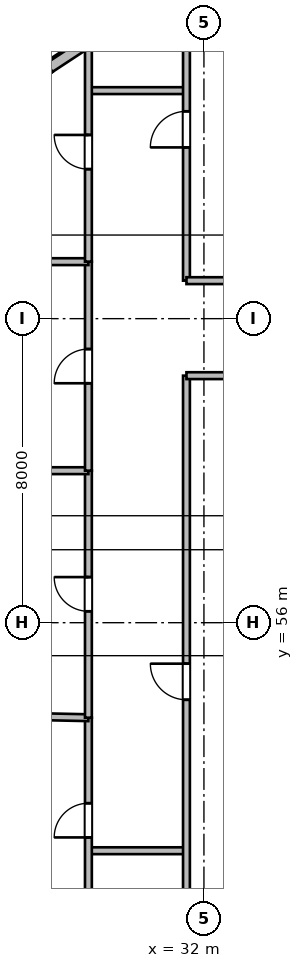
"""IFC4 building model, lengths in metres.
Left out: names, types, materials, properties, quantities, classifications, styles, units other than length and angle.
Written with IfcOpenShell. Run it as: python <this file> out.ifc"""

import sys

from ifc_helpers import new_model, si_unit, direction, frame, frame_2d, origin, place, context, subcontext, project, spatial, rectangle, extrude, source, transform, mapped, element, fill, save


model = new_model("IFC4")
c1 = context("Model", 3, precision=1e-05, world=origin(), true_north=direction((0.0, 1.0)))
c2 = subcontext(c1, "Body", "Model", "MODEL_VIEW")
j1 = project(units=[si_unit("LENGTHUNIT", "METRE"), si_unit("PLANEANGLEUNIT", "RADIAN")], contexts=[c1])
p1 = place(None, origin())
s1 = spatial("IfcSite", under=j1, at=p1, CompositionType="ELEMENT")
p2 = place(p1, origin())
s2 = spatial("IfcBuilding", under=s1, at=p2, CompositionType="ELEMENT")
p3 = place(p2, frame((0.0, 0.0, 170.1)))
s3 = spatial("IfcBuildingStorey", under=s2, at=p3, CompositionType="ELEMENT", Elevation=170.1)
m1 = source(origin(), c2, "Body", "SweptSolid", [
    extrude(rectangle(XDim=2.812, YDim=0.28, at=frame_2d((1.406, 0.0))), origin(), (0.0, 0.0, 1.0), 3.65),
])
p4 = place(p3, frame((33.945, 48.973, 0.0), z_axis=(0.0, 0.0, 1.0), x_axis=(-0.694583668785, -0.719411931411, 0.0)))
e1 = element("IfcWall", 1, at=p4, inside=s3, PredefinedType="SOLIDWALL", context=c2, shape_type="MappedRepresentation", body=[
    mapped(m1, transform((0.0, 0.0, 0.0), scale=1.0)),
])
m2 = source(origin(), c2, "Body", "SweptSolid", [
    extrude(rectangle(XDim=4.634, YDim=0.28, at=frame_2d((2.317, 0.0))), origin(), (0.0, 0.0, 1.0), 3.65),
])
p5 = place(p3, frame((24.381, 67.642, 0.0), z_axis=(0.0, 0.0, 1.0), x_axis=(0.767910229096, 0.640557475993, 0.0)))
e2 = element("IfcWall", 2, at=p5, inside=s3, PredefinedType="SOLIDWALL", context=c2, shape_type="MappedRepresentation", body=[
    mapped(m2, transform((0.0, 0.0, 0.0), scale=1.0)),
])
m3 = source(origin(), c2, "Body", "SweptSolid", [
    extrude(rectangle(XDim=4.501, YDim=0.28, at=frame_2d((2.25, 0.0))), origin(), (0.0, 0.0, 1.0), 3.65),
])
p6 = place(p3, frame((27.939, 70.61, 0.0), z_axis=(0.0, 0.0, 1.0), x_axis=(0.835984920737, 0.548752414391, 0.0)))
e3 = element("IfcWall", 3, at=p6, inside=s3, PredefinedType="SOLIDWALL", context=c2, shape_type="MappedRepresentation", body=[
    mapped(m3, transform((0.0, 0.0, 0.0), scale=1.0)),
])
m4 = source(origin(), c2, "Body", "SweptSolid", [
    extrude(rectangle(XDim=2.5, YDim=0.18, at=frame_2d((1.25, 0.0))), origin(), (0.0, 0.0, 1.0), 3.65),
])
p7 = place(p3, frame((29.0, 50.0, 0.0), z_axis=(0.0, 0.0, 1.0), x_axis=(1.0, 0.0, 0.0)))
e4 = element("IfcWall", 4, at=p7, inside=s3, PredefinedType="PLUMBINGWALL", context=c2, shape_type="MappedRepresentation", body=[
    mapped(m4, transform((0.0, 0.0, 0.0), scale=1.0)),
])
m5 = source(origin(), c2, "Body", "SweptSolid", [
    extrude(rectangle(XDim=2.5, YDim=0.18, at=frame_2d((1.25, 0.0))), origin(), (0.0, 0.0, 1.0), 3.022),
])
p8 = place(p3, frame((29.0, 70.0, 0.0), z_axis=(0.0, 0.0, 1.0), x_axis=(1.0, 0.0, 0.0)))
e5 = element("IfcWall", 5, at=p8, inside=s3, PredefinedType="PLUMBINGWALL", context=c2, shape_type="MappedRepresentation", body=[
    mapped(m5, transform((0.0, 0.0, 0.0), scale=1.0)),
])
m6 = source(origin(), c2, "Body", "SweptSolid", [
    extrude(rectangle(XDim=10.735, YDim=0.18, at=frame_2d((5.368, 0.0))), origin(), (0.0, 0.0, 1.0), 2.942),
])
p9 = place(p3, frame((28.96, 42.765, 0.0), z_axis=(0.0, 0.0, 1.0), x_axis=(0.0, 1.0, 0.0)))
e6 = element("IfcWall", 6, at=p9, inside=s3, PredefinedType="PLUMBINGWALL", context=c2, shape_type="MappedRepresentation", body=[
    mapped(m6, transform((0.0, 0.0, 0.0), scale=1.0)),
])
p10 = place(p9, frame((7.585, 0.0, 0.0)))
e7 = element("IfcOpeningElement", 7, at=p10, cuts=e6, PredefinedType="OPENING", context=c2, shape_type="SweptSolid", body=[
    extrude(rectangle(XDim=0.9, YDim=2.08, at=frame_2d((0.45, 1.04))), frame((0.0, 0.1, 0.0), z_axis=(0.0, -1.0, 0.0), x_axis=(1.0, 0.0, 0.0)), (0.0, 0.0, 1.0), 0.2),
])
m7 = source(origin(), c2, "Body", "SweptSolid", [
    extrude(rectangle(XDim=14.72, YDim=0.18, at=frame_2d((7.36, 0.0))), origin(), (0.0, 0.0, 1.0), 3.65),
])
p11 = place(p3, frame((14.243, 53.813, 0.0), z_axis=(0.0, 0.0, 1.0), x_axis=(0.999773932637, -0.021262258118, 0.0)))
e8 = element("IfcWall", 8, at=p11, inside=s3, PredefinedType="PLUMBINGWALL", context=c2, shape_type="MappedRepresentation", body=[
    mapped(m7, transform((0.0, 0.0, 0.0), scale=1.0)),
])
m8 = source(origin(), c2, "Body", "SweptSolid", [
    extrude(rectangle(XDim=6.5, YDim=0.18, at=frame_2d((3.25, 0.0))), origin(), (0.0, 0.0, 1.0), 3.081),
])
p12 = place(p3, frame((28.96, 53.5, 0.0), z_axis=(0.0, 0.0, 1.0), x_axis=(0.0, 1.0, 0.0)))
e9 = element("IfcWall", 9, at=p12, inside=s3, PredefinedType="PLUMBINGWALL", context=c2, shape_type="MappedRepresentation", body=[
    mapped(m8, transform((0.0, 0.0, 0.0), scale=1.0)),
])
p13 = place(p12, frame((2.8, 0.0, 0.0)))
e10 = element("IfcOpeningElement", 10, at=p13, cuts=e9, PredefinedType="OPENING", context=c2, shape_type="SweptSolid", body=[
    extrude(rectangle(XDim=0.9, YDim=2.08, at=frame_2d((0.45, 1.04))), frame((0.0, 0.1, 0.0), z_axis=(0.0, -1.0, 0.0), x_axis=(1.0, 0.0, 0.0)), (0.0, 0.0, 1.0), 0.2),
])
m9 = source(origin(), c2, "Body", "SweptSolid", [
    extrude(rectangle(XDim=11.144, YDim=0.18, at=frame_2d((5.572, 0.0))), origin(), (0.0, 0.0, 1.0), 3.65),
])
p14 = place(p3, frame((17.816, 60.0, 0.0), z_axis=(0.0, 0.0, 1.0), x_axis=(1.0, 0.0, 0.0)))
e11 = element("IfcWall", 11, at=p14, inside=s3, PredefinedType="PLUMBINGWALL", context=c2, shape_type="MappedRepresentation", body=[
    mapped(m9, transform((0.0, 0.0, 0.0), scale=1.0)),
])
m10 = source(origin(), c2, "Body", "SweptSolid", [
    extrude(rectangle(XDim=5.5, YDim=0.18, at=frame_2d((2.75, 0.0))), origin(), (0.0, 0.0, 1.0), 2.942),
])
p15 = place(p3, frame((28.96, 60.0, 0.0), z_axis=(0.0, 0.0, 1.0), x_axis=(0.0, 1.0, 0.0)))
e12 = element("IfcWall", 12, at=p15, inside=s3, PredefinedType="PLUMBINGWALL", context=c2, shape_type="MappedRepresentation", body=[
    mapped(m10, transform((0.0, 0.0, 0.0), scale=1.0)),
])
p16 = place(p15, frame((2.3, 0.0, 0.0)))
e13 = element("IfcOpeningElement", 13, at=p16, cuts=e12, PredefinedType="OPENING", context=c2, shape_type="SweptSolid", body=[
    extrude(rectangle(XDim=0.9, YDim=2.08, at=frame_2d((0.45, 1.04))), frame((0.0, 0.1, 0.0), z_axis=(0.0, -1.0, 0.0), x_axis=(1.0, 0.0, 0.0)), (0.0, 0.0, 1.0), 0.2),
])
m11 = source(origin(), c2, "Body", "SweptSolid", [
    extrude(rectangle(XDim=6.633, YDim=0.18, at=frame_2d((3.317, 0.0))), origin(), (0.0, 0.0, 1.0), 3.65),
])
p17 = place(p3, frame((22.327, 65.5, 0.0), z_axis=(0.0, 0.0, 1.0), x_axis=(1.0, 0.0, 0.0)))
e14 = element("IfcWall", 14, at=p17, inside=s3, PredefinedType="PLUMBINGWALL", context=c2, shape_type="MappedRepresentation", body=[
    mapped(m11, transform((0.0, 0.0, 0.0), scale=1.0)),
])
m12 = source(origin(), c2, "Body", "SweptSolid", [
    extrude(rectangle(XDim=5.768, YDim=0.18, at=frame_2d((2.884, 0.0))), origin(), (0.0, 0.0, 1.0), 3.65),
])
p18 = place(p3, frame((28.96, 65.5, 0.0), z_axis=(0.0, 0.0, 1.0), x_axis=(0.0, 1.0, 0.0)))
e15 = element("IfcWall", 15, at=p18, inside=s3, PredefinedType="PLUMBINGWALL", context=c2, shape_type="MappedRepresentation", body=[
    mapped(m12, transform((0.0, 0.0, 0.0), scale=1.0)),
])
p19 = place(p18, frame((2.434, 0.0, 0.0)))
e16 = element("IfcOpeningElement", 16, at=p19, cuts=e15, PredefinedType="OPENING", context=c2, shape_type="SweptSolid", body=[
    extrude(rectangle(XDim=0.9, YDim=2.08, at=frame_2d((0.45, 1.04))), frame((0.0, 0.1, 0.0), z_axis=(0.0, -1.0, 0.0), x_axis=(1.0, 0.0, 0.0)), (0.0, 0.0, 1.0), 0.2),
])
m13 = source(origin(), c2, "Body", "SweptSolid", [
    extrude(rectangle(XDim=16.106, YDim=0.18, at=frame_2d((8.053, 0.0))), origin(), (0.0, 0.0, 1.0), 2.942),
])
p20 = place(p3, frame((31.54, 46.394, 0.0), z_axis=(0.0, 0.0, 1.0), x_axis=(0.0, 1.0, 0.0)))
e17 = element("IfcWall", 17, at=p20, inside=s3, PredefinedType="PLUMBINGWALL", context=c2, shape_type="MappedRepresentation", body=[
    mapped(m13, transform((0.0, 0.0, 0.0), scale=1.0)),
])
p21 = place(p20, frame((7.578, 0.0, 0.0)))
e18 = element("IfcOpeningElement", 18, at=p21, cuts=e17, PredefinedType="OPENING", context=c2, shape_type="SweptSolid", body=[
    extrude(rectangle(XDim=0.95, YDim=2.1, at=frame_2d((0.475, 1.05))), frame((0.0, 0.1, 0.0), z_axis=(0.0, -1.0, 0.0), x_axis=(1.0, 0.0, 0.0)), (0.0, 0.0, 1.0), 0.2),
])
m14 = source(origin(), c2, "Body", "SweptSolid", [
    extrude(rectangle(XDim=2.86, YDim=0.18, at=frame_2d((1.43, 0.0))), origin(), (0.0, 0.0, 1.0), 3.65),
])
p22 = place(p3, frame((31.54, 62.5, 0.0), z_axis=(0.0, 0.0, 1.0), x_axis=(1.0, 0.0, 0.0)))
e19 = element("IfcWall", 19, at=p22, inside=s3, PredefinedType="PLUMBINGWALL", context=c2, shape_type="MappedRepresentation", body=[
    mapped(m14, transform((0.0, 0.0, 0.0), scale=1.0)),
])
m15 = source(origin(), c2, "Body", "SweptSolid", [
    extrude(rectangle(XDim=7.962, YDim=0.18, at=frame_2d((3.981, 0.0))), origin(), (0.0, 0.0, 1.0), 3.65),
])
p23 = place(p3, frame((31.54, 65.0, 0.0), z_axis=(0.0, 0.0, 1.0), x_axis=(0.0, 1.0, 0.0)))
e20 = element("IfcWall", 20, at=p23, inside=s3, PredefinedType="PLUMBINGWALL", context=c2, shape_type="MappedRepresentation", body=[
    mapped(m15, transform((0.0, 0.0, 0.0), scale=1.0)),
])
p24 = place(p23, frame((3.506, 0.0, 0.0)))
e21 = element("IfcOpeningElement", 21, at=p24, cuts=e20, PredefinedType="OPENING", context=c2, shape_type="SweptSolid", body=[
    extrude(rectangle(XDim=0.95, YDim=2.1, at=frame_2d((0.475, 1.05))), frame((0.0, 0.1, 0.0), z_axis=(0.0, -1.0, 0.0), x_axis=(1.0, 0.0, 0.0)), (0.0, 0.0, 1.0), 0.2),
])
p25 = place(p3, frame((31.54, 65.0, 0.0), z_axis=(0.0, 0.0, 1.0), x_axis=(1.0, 0.0, 0.0)))
e22 = element("IfcWall", 22, at=p25, inside=s3, PredefinedType="PLUMBINGWALL", context=c2, shape_type="MappedRepresentation", body=[
    mapped(m14, transform((0.0, 0.0, 0.0), scale=1.0)),
])
m16 = source(origin(), c2, "Body", "SweptSolid", [
    extrude(rectangle(XDim=0.9, YDim=2.08, at=frame_2d((0.45, 1.04))), frame((0.0, 0.025, 0.0), z_axis=(0.0, -1.0, 0.0), x_axis=(1.0, 0.0, 0.0)), (0.0, 0.0, 1.0), 0.05),
])
p26 = place(p10, origin())
e23 = element("IfcDoor", 23, at=p26, inside=s3, OperationType="SINGLE_SWING_LEFT", PredefinedType="DOOR", context=c2, shape_type="MappedRepresentation", body=[
    mapped(m16, transform((0.0, 0.0, 0.0), scale=1.0)),
])
fill(e7, e23)
p27 = place(p13, origin())
e24 = element("IfcDoor", 24, at=p27, inside=s3, OperationType="SINGLE_SWING_RIGHT", PredefinedType="DOOR", context=c2, shape_type="MappedRepresentation", body=[
    mapped(m16, transform((0.0, 0.0, 0.0), scale=1.0)),
])
fill(e10, e24)
p28 = place(p16, origin())
e25 = element("IfcDoor", 25, at=p28, inside=s3, OperationType="SINGLE_SWING_LEFT", PredefinedType="DOOR", context=c2, shape_type="MappedRepresentation", body=[
    mapped(m16, transform((0.0, 0.0, 0.0), scale=1.0)),
])
fill(e13, e25)
p29 = place(p19, origin())
e26 = element("IfcDoor", 26, at=p29, inside=s3, OperationType="SINGLE_SWING_RIGHT", PredefinedType="DOOR", context=c2, shape_type="MappedRepresentation", body=[
    mapped(m16, transform((0.0, 0.0, 0.0), scale=1.0)),
])
fill(e16, e26)
m17 = source(origin(), c2, "Body", "SweptSolid", [
    extrude(rectangle(XDim=0.95, YDim=2.1, at=frame_2d((0.475, 1.05))), frame((0.0, 0.025, 0.0), z_axis=(0.0, -1.0, 0.0), x_axis=(1.0, 0.0, 0.0)), (0.0, 0.0, 1.0), 0.05),
])
p30 = place(p21, origin())
e27 = element("IfcDoor", 27, at=p30, inside=s3, OperationType="SINGLE_SWING_RIGHT", PredefinedType="DOOR", context=c2, shape_type="MappedRepresentation", body=[
    mapped(m17, transform((0.0, 0.0, 0.0), scale=1.0)),
])
fill(e18, e27)
p31 = place(p24, origin())
e28 = element("IfcDoor", 28, at=p31, inside=s3, OperationType="SINGLE_SWING_LEFT", PredefinedType="DOOR", context=c2, shape_type="MappedRepresentation", body=[
    mapped(m17, transform((0.0, 0.0, 0.0), scale=1.0)),
])
fill(e21, e28)
save(model, sys.argv[1])
